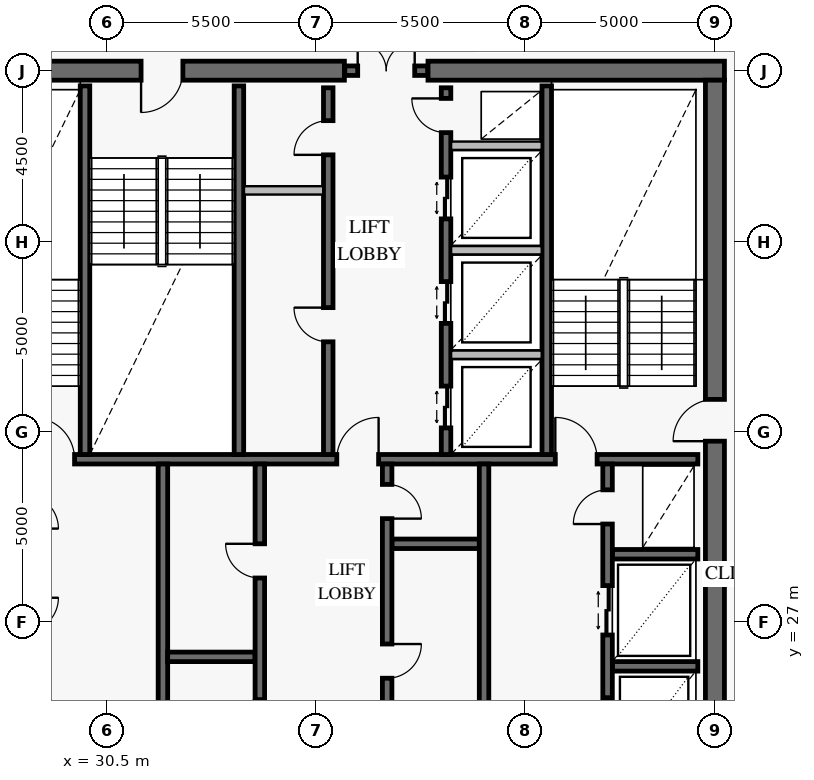
"""IFC4 building model, lengths in metres.
Left out: names, types, materials, properties, quantities, classifications, styles, units other than length and angle.
Written with IfcOpenShell. Run it as: python <this file> out.ifc"""

import sys

from ifc_helpers import new_model, si_unit, direction, frame, frame_2d, origin, place, context, subcontext, project, spatial, rectangle, extrude, element, fill, save


model = new_model("IFC4")
c1 = context("Model", 3, precision=1e-05, world=origin(), true_north=direction((0.0, 1.0)))
c2 = subcontext(c1, "Body", "Model", "MODEL_VIEW")
j1 = project(units=[si_unit("LENGTHUNIT", "METRE"), si_unit("PLANEANGLEUNIT", "RADIAN")], contexts=[c1])
p1 = place(None, origin())
s1 = spatial("IfcSite", under=j1, at=p1, CompositionType="ELEMENT")
p2 = place(p1, origin())
s2 = spatial("IfcBuilding", under=s1, at=p2, CompositionType="ELEMENT")
p3 = place(p2, frame((0.0, 0.0, 353.8)))
s3 = spatial("IfcBuildingStorey", under=s2, at=p3, CompositionType="ELEMENT", Elevation=353.8)
p4 = place(p3, frame((46.75, 41.5, 0.0), z_axis=(0.0, 0.0, 1.0), x_axis=(-1.0, 0.0, 0.0)))
e1 = element("IfcWall", 1, at=p4, inside=s3, PredefinedType="SHEAR", context=c2, shape_type="SweptSolid", body=[
    extrude(rectangle(XDim=7.8, YDim=0.5, at=frame_2d((3.9, 0.0))), origin(), (0.0, 0.0, 1.0), 3.8),
])
p5 = place(p3, frame((36.75, 41.5, 0.0), z_axis=(0.0, 0.0, 1.0), x_axis=(-1.0, 0.0, 0.0)))
e2 = element("IfcWall", 2, at=p5, inside=s3, PredefinedType="SHEAR", context=c2, shape_type="SweptSolid", body=[
    extrude(rectangle(XDim=11.5, YDim=0.5, at=frame_2d((5.75, 0.0))), origin(), (0.0, 0.0, 1.0), 3.8),
])
p6 = place(p5, frame((4.25, 0.0, 0.0)))
e3 = element("IfcOpeningElement", 3, at=p6, cuts=e2, PredefinedType="OPENING", context=c2, shape_type="SweptSolid", body=[
    extrude(rectangle(XDim=1.1, YDim=2.15, at=frame_2d((0.55, 1.075))), frame((0.0, 0.262, 0.0), z_axis=(0.0, -1.0, 0.0), x_axis=(1.0, 0.0, 0.0)), (0.0, 0.0, 1.0), 0.524),
])
p7 = place(p3, frame((46.5, 22.75, 0.0), z_axis=(0.0, 0.0, 1.0), x_axis=(0.0, 1.0, 0.0)))
e4 = element("IfcWall", 4, at=p7, inside=s3, PredefinedType="SHEAR", context=c2, shape_type="SweptSolid", body=[
    extrude(rectangle(XDim=18.5, YDim=0.5, at=frame_2d((9.25, 0.0))), origin(), (0.0, 0.0, 1.0), 3.8),
])
p8 = place(p7, frame((9.0, 0.0, 0.0)))
e5 = element("IfcOpeningElement", 5, at=p8, cuts=e4, PredefinedType="OPENING", context=c2, shape_type="SweptSolid", body=[
    extrude(rectangle(XDim=1.1, YDim=2.15, at=frame_2d((0.55, 1.075))), frame((0.0, 0.262, 0.0), z_axis=(0.0, -1.0, 0.0), x_axis=(1.0, 0.0, 0.0)), (0.0, 0.0, 1.0), 0.524),
])
p9 = place(p3, frame((36.76, 41.5, 0.0), z_axis=(0.0, 0.0, 1.0), x_axis=(1.0, 0.0, 0.0)))
e6 = element("IfcWall", 6, at=p9, inside=s3, PredefinedType="SOLIDWALL", context=c2, shape_type="SweptSolid", body=[
    extrude(rectangle(XDim=2.18, YDim=0.25, at=frame_2d((1.09, 0.0))), origin(), (0.0, 0.0, 1.0), 3.8),
])
p10 = place(p9, frame((0.34, 0.0, 0.0)))
e7 = element("IfcOpeningElement", 7, at=p10, cuts=e6, PredefinedType="OPENING", context=c2, shape_type="SweptSolid", body=[
    extrude(rectangle(XDim=1.5, YDim=2.15, at=frame_2d((0.75, 1.075))), frame((0.0, 0.137, 0.0), z_axis=(0.0, -1.0, 0.0), x_axis=(1.0, 0.0, 0.0)), (0.0, 0.0, 1.0), 0.274),
])
p11 = place(p3, frame((25.95, 31.275, 0.0), z_axis=(0.0, 0.0, 1.0), x_axis=(1.0, 0.0, 0.0)))
e8 = element("IfcWall", 8, at=p11, inside=s3, PredefinedType="SOLIDWALL", context=c2, shape_type="SweptSolid", body=[
    extrude(rectangle(XDim=20.1, YDim=0.25, at=frame_2d((10.05, 0.0))), origin(), (0.0, 0.0, 1.0), 3.8),
])
p12 = place(p11, frame((2.6, 0.0, 0.0)))
e9 = element("IfcOpeningElement", 9, at=p12, cuts=e8, PredefinedType="OPENING", context=c2, shape_type="SweptSolid", body=[
    extrude(rectangle(XDim=1.1, YDim=2.15, at=frame_2d((0.55, 1.075))), frame((0.0, 0.137, 0.0), z_axis=(0.0, -1.0, 0.0), x_axis=(1.0, 0.0, 0.0)), (0.0, 0.0, 1.0), 0.274),
])
p13 = place(p11, frame((10.6, 0.0, 0.0)))
e10 = element("IfcOpeningElement", 10, at=p13, cuts=e8, PredefinedType="OPENING", context=c2, shape_type="SweptSolid", body=[
    extrude(rectangle(XDim=1.1, YDim=2.15, at=frame_2d((0.55, 1.075))), frame((0.0, 0.137, 0.0), z_axis=(0.0, -1.0, 0.0), x_axis=(1.0, 0.0, 0.0)), (0.0, 0.0, 1.0), 0.274),
])
p14 = place(p11, frame((16.35, 0.0, 0.0)))
e11 = element("IfcOpeningElement", 11, at=p14, cuts=e8, PredefinedType="OPENING", context=c2, shape_type="SweptSolid", body=[
    extrude(rectangle(XDim=1.1, YDim=2.15, at=frame_2d((0.55, 1.075))), frame((0.0, 0.137, 0.0), z_axis=(0.0, -1.0, 0.0), x_axis=(1.0, 0.0, 0.0)), (0.0, 0.0, 1.0), 0.274),
])
for number, where, z_axis, x_axis in (
    (12, (29.925, 31.4, 0.0), (0.0, 0.0, 1.0), (0.0, 1.0, 0.0)),
    (13, (33.975, 31.4, 0.0), (0.0, 0.0, 1.0), (0.0, 1.0, 0.0)),
    (14, (42.075, 31.4, 0.0), (0.0, 0.0, 1.0), (0.0, 1.0, 0.0)),
):
    element("IfcWall", number, at=place(p3, frame(where, z_axis=z_axis, x_axis=x_axis)), inside=s3, PredefinedType="SOLIDWALL", context=c2, shape_type="SweptSolid", body=[
        extrude(rectangle(XDim=9.7, YDim=0.25, at=frame_2d((4.85, 0.0))), origin(), (0.0, 0.0, 1.0), 3.8),
    ])
p15 = place(p3, frame((36.325, 31.4, 0.0), z_axis=(0.0, 0.0, 1.0), x_axis=(0.0, 1.0, 0.0)))
e15 = element("IfcWall", 15, at=p15, inside=s3, PredefinedType="SOLIDWALL", context=c2, shape_type="SweptSolid", body=[
    extrude(rectangle(XDim=9.65, YDim=0.25, at=frame_2d((4.825, 0.0))), origin(), (0.0, 0.0, 1.0), 3.8),
])
p16 = place(p15, frame((2.965, 0.0, 0.0)))
e16 = element("IfcOpeningElement", 16, at=p16, cuts=e15, PredefinedType="OPENING", context=c2, shape_type="SweptSolid", body=[
    extrude(rectangle(XDim=0.9, YDim=2.1, at=frame_2d((0.45, 1.05))), frame((0.0, 0.137, 0.0), z_axis=(0.0, -1.0, 0.0), x_axis=(1.0, 0.0, 0.0)), (0.0, 0.0, 1.0), 0.274),
])
p17 = place(p15, frame((7.885, 0.0, 0.0)))
e17 = element("IfcOpeningElement", 17, at=p17, cuts=e15, PredefinedType="OPENING", context=c2, shape_type="SweptSolid", body=[
    extrude(rectangle(XDim=0.9, YDim=2.1, at=frame_2d((0.45, 1.05))), frame((0.0, 0.137, 0.0), z_axis=(0.0, -1.0, 0.0), x_axis=(1.0, 0.0, 0.0)), (0.0, 0.0, 1.0), 0.274),
])
p18 = place(p3, frame((39.425, 31.4, 0.0), z_axis=(0.0, 0.0, 1.0), x_axis=(0.0, 1.0, 0.0)))
e18 = element("IfcWall", 18, at=p18, inside=s3, PredefinedType="SOLIDWALL", context=c2, shape_type="SweptSolid", body=[
    extrude(rectangle(XDim=9.65, YDim=0.25, at=frame_2d((4.825, 0.0))), origin(), (0.0, 0.0, 1.0), 3.8),
])
p19 = place(p18, frame((0.7, 0.0, 0.0)))
e19 = element("IfcOpeningElement", 19, at=p19, cuts=e18, PredefinedType="OPENING", context=c2, shape_type="SweptSolid", body=[
    extrude(rectangle(XDim=1.1, YDim=2.2, at=frame_2d((0.55, 1.1))), frame((0.0, 0.137, 0.0), z_axis=(0.0, -1.0, 0.0), x_axis=(1.0, 0.0, 0.0)), (0.0, 0.0, 1.0), 0.274),
])
p20 = place(p18, frame((3.45, 0.0, 0.0)))
e20 = element("IfcOpeningElement", 20, at=p20, cuts=e18, PredefinedType="OPENING", context=c2, shape_type="SweptSolid", body=[
    extrude(rectangle(XDim=1.1, YDim=2.2, at=frame_2d((0.55, 1.1))), frame((0.0, 0.137, 0.0), z_axis=(0.0, -1.0, 0.0), x_axis=(1.0, 0.0, 0.0)), (0.0, 0.0, 1.0), 0.274),
])
p21 = place(p18, frame((6.2, 0.0, 0.0)))
e21 = element("IfcOpeningElement", 21, at=p21, cuts=e18, PredefinedType="OPENING", context=c2, shape_type="SweptSolid", body=[
    extrude(rectangle(XDim=1.1, YDim=2.2, at=frame_2d((0.55, 1.1))), frame((0.0, 0.137, 0.0), z_axis=(0.0, -1.0, 0.0), x_axis=(1.0, 0.0, 0.0)), (0.0, 0.0, 1.0), 0.274),
])
p22 = place(p18, frame((8.47, 0.0, 0.0)))
e22 = element("IfcOpeningElement", 22, at=p22, cuts=e18, PredefinedType="OPENING", context=c2, shape_type="SweptSolid", body=[
    extrude(rectangle(XDim=0.9, YDim=2.1, at=frame_2d((0.45, 1.05))), frame((0.0, 0.137, 0.0), z_axis=(0.0, -1.0, 0.0), x_axis=(1.0, 0.0, 0.0)), (0.0, 0.0, 1.0), 0.274),
])
p23 = place(p3, frame((31.975, 22.95, 0.0), z_axis=(0.0, 0.0, 1.0), x_axis=(0.0, 1.0, 0.0)))
e23 = element("IfcWall", 23, at=p23, inside=s3, PredefinedType="SOLIDWALL", context=c2, shape_type="SweptSolid", body=[
    extrude(rectangle(XDim=8.2, YDim=0.25, at=frame_2d((4.1, 0.0))), origin(), (0.0, 0.0, 1.0), 3.8),
])
p24 = place(p3, frame((32.1, 26.075, 0.0), z_axis=(0.0, 0.0, 1.0), x_axis=(1.0, 0.0, 0.0)))
e24 = element("IfcWall", 24, at=p24, inside=s3, PredefinedType="SOLIDWALL", context=c2, shape_type="SweptSolid", body=[
    extrude(rectangle(XDim=2.3, YDim=0.25, at=frame_2d((1.15, 0.0))), origin(), (0.0, 0.0, 1.0), 3.8),
])
p25 = place(p3, frame((34.525, 22.95, 0.0), z_axis=(0.0, 0.0, 1.0), x_axis=(0.0, 1.0, 0.0)))
e25 = element("IfcWall", 25, at=p25, inside=s3, PredefinedType="SOLIDWALL", context=c2, shape_type="SweptSolid", body=[
    extrude(rectangle(XDim=8.2, YDim=0.25, at=frame_2d((4.1, 0.0))), origin(), (0.0, 0.0, 1.0), 3.8),
])
p26 = place(p25, frame((1.1, 0.0, 0.0)))
e26 = element("IfcOpeningElement", 26, at=p26, cuts=e25, PredefinedType="OPENING", context=c2, shape_type="SweptSolid", body=[
    extrude(rectangle(XDim=0.9, YDim=2.1, at=frame_2d((0.45, 1.05))), frame((0.0, 0.137, 0.0), z_axis=(0.0, -1.0, 0.0), x_axis=(1.0, 0.0, 0.0)), (0.0, 0.0, 1.0), 0.274),
])
p27 = place(p25, frame((5.2, 0.0, 0.0)))
e27 = element("IfcOpeningElement", 27, at=p27, cuts=e25, PredefinedType="OPENING", context=c2, shape_type="SweptSolid", body=[
    extrude(rectangle(XDim=0.9, YDim=2.1, at=frame_2d((0.45, 1.05))), frame((0.0, 0.137, 0.0), z_axis=(0.0, -1.0, 0.0), x_axis=(1.0, 0.0, 0.0)), (0.0, 0.0, 1.0), 0.274),
])
p28 = place(p3, frame((38.0, 29.05, 0.0), z_axis=(0.0, 0.0, 1.0), x_axis=(1.0, 0.0, 0.0)))
e28 = element("IfcWall", 28, at=p28, inside=s3, PredefinedType="SOLIDWALL", context=c2, shape_type="SweptSolid", body=[
    extrude(rectangle(XDim=2.3, YDim=0.25, at=frame_2d((1.15, 0.0))), origin(), (0.0, 0.0, 1.0), 3.8),
])
p29 = place(p3, frame((37.875, 22.95, 0.0), z_axis=(0.0, 0.0, 1.0), x_axis=(0.0, 1.0, 0.0)))
e29 = element("IfcWall", 29, at=p29, inside=s3, PredefinedType="SOLIDWALL", context=c2, shape_type="SweptSolid", body=[
    extrude(rectangle(XDim=8.2, YDim=0.25, at=frame_2d((4.1, 0.0))), origin(), (0.0, 0.0, 1.0), 3.8),
])
p30 = place(p29, frame((2.562, 0.0, 0.0)))
e30 = element("IfcOpeningElement", 30, at=p30, cuts=e29, PredefinedType="OPENING", context=c2, shape_type="SweptSolid", body=[
    extrude(rectangle(XDim=0.9, YDim=2.1, at=frame_2d((0.45, 1.05))), frame((0.0, 0.137, 0.0), z_axis=(0.0, -1.0, 0.0), x_axis=(1.0, 0.0, 0.0)), (0.0, 0.0, 1.0), 0.274),
])
p31 = place(p29, frame((6.762, 0.0, 0.0)))
e31 = element("IfcOpeningElement", 31, at=p31, cuts=e29, PredefinedType="OPENING", context=c2, shape_type="SweptSolid", body=[
    extrude(rectangle(XDim=0.9, YDim=2.1, at=frame_2d((0.45, 1.05))), frame((0.0, 0.137, 0.0), z_axis=(0.0, -1.0, 0.0), x_axis=(1.0, 0.0, 0.0)), (0.0, 0.0, 1.0), 0.274),
])
p32 = place(p3, frame((40.425, 22.95, 0.0), z_axis=(0.0, 0.0, 1.0), x_axis=(0.0, 1.0, 0.0)))
e32 = element("IfcWall", 32, at=p32, inside=s3, PredefinedType="SOLIDWALL", context=c2, shape_type="SweptSolid", body=[
    extrude(rectangle(XDim=8.2, YDim=0.25, at=frame_2d((4.1, 0.0))), origin(), (0.0, 0.0, 1.0), 3.8),
])
for number, where, z_axis, x_axis in (
    (33, (43.8, 25.825, 0.0), (0.0, 0.0, 1.0), (1.0, 0.0, 0.0)),
    (34, (43.8, 28.775, 0.0), (0.0, 0.0, 1.0), (1.0, 0.0, 0.0)),
):
    element("IfcWall", number, at=place(p3, frame(where, z_axis=z_axis, x_axis=x_axis)), inside=s3, PredefinedType="SOLIDWALL", context=c2, shape_type="SweptSolid", body=[
        extrude(rectangle(XDim=2.25, YDim=0.25, at=frame_2d((1.125, 0.0))), origin(), (0.0, 0.0, 1.0), 3.8),
    ])
p33 = place(p3, frame((43.675, 22.95, 0.0), z_axis=(0.0, 0.0, 1.0), x_axis=(0.0, 1.0, 0.0)))
e35 = element("IfcWall", 35, at=p33, inside=s3, PredefinedType="SOLIDWALL", context=c2, shape_type="SweptSolid", body=[
    extrude(rectangle(XDim=8.2, YDim=0.25, at=frame_2d((4.1, 0.0))), origin(), (0.0, 0.0, 1.0), 3.8),
])
p34 = place(p33, frame((0.75, 0.0, 0.0)))
e36 = element("IfcOpeningElement", 36, at=p34, cuts=e35, PredefinedType="OPENING", context=c2, shape_type="SweptSolid", body=[
    extrude(rectangle(XDim=1.3, YDim=2.3, at=frame_2d((0.65, 1.15))), frame((0.0, 0.137, 0.0), z_axis=(0.0, -1.0, 0.0), x_axis=(1.0, 0.0, 0.0)), (0.0, 0.0, 1.0), 0.274),
])
p35 = place(p33, frame((3.7, 0.0, 0.0)))
e37 = element("IfcOpeningElement", 37, at=p35, cuts=e35, PredefinedType="OPENING", context=c2, shape_type="SweptSolid", body=[
    extrude(rectangle(XDim=1.3, YDim=2.3, at=frame_2d((0.65, 1.15))), frame((0.0, 0.137, 0.0), z_axis=(0.0, -1.0, 0.0), x_axis=(1.0, 0.0, 0.0)), (0.0, 0.0, 1.0), 0.274),
])
p36 = place(p33, frame((6.62, 0.0, 0.0)))
e38 = element("IfcOpeningElement", 38, at=p36, cuts=e35, PredefinedType="OPENING", context=c2, shape_type="SweptSolid", body=[
    extrude(rectangle(XDim=0.9, YDim=2.1, at=frame_2d((0.45, 1.05))), frame((0.0, 0.137, 0.0), z_axis=(0.0, -1.0, 0.0), x_axis=(1.0, 0.0, 0.0)), (0.0, 0.0, 1.0), 0.274),
])
p37 = place(p3, frame((34.108, 38.35, 0.0), z_axis=(0.0, 0.0, 1.0), x_axis=(1.0, 0.0, 0.0)))
e39 = element("IfcWall", 39, at=p37, inside=s3, PredefinedType="PARTITIONING", context=c2, shape_type="SweptSolid", body=[
    extrude(rectangle(XDim=2.084, YDim=0.22, at=frame_2d((1.042, 0.0))), origin(), (0.0, 0.0, 1.0), 3.35),
])
for number, where, z_axis, x_axis in (
    (40, (39.558, 34.025, 0.0), (0.0, 0.0, 1.0), (1.0, 0.0, 0.0)),
    (41, (39.558, 36.775, 0.0), (0.0, 0.0, 1.0), (1.0, 0.0, 0.0)),
    (42, (39.558, 39.525, 0.0), (0.0, 0.0, 1.0), (1.0, 0.0, 0.0)),
):
    element("IfcWall", number, at=place(p3, frame(where, z_axis=z_axis, x_axis=x_axis)), inside=s3, PredefinedType="PARTITIONING", context=c2, shape_type="SweptSolid", body=[
        extrude(rectangle(XDim=2.384, YDim=0.22, at=frame_2d((1.192, 0.0))), origin(), (0.0, 0.0, 1.0), 3.35),
    ])
p38 = place(p8, origin())
e43 = element("IfcDoor", 43, at=p38, inside=s3, OperationType="SINGLE_SWING_LEFT", PredefinedType="USERDEFINED", context=c2, shape_type="SweptSolid", body=[
    extrude(rectangle(XDim=1.1, YDim=2.15, at=frame_2d((0.55, 1.075))), frame((0.0, 0.025, 0.0), z_axis=(0.0, -1.0, 0.0), x_axis=(1.0, 0.0, 0.0)), (0.0, 0.0, 1.0), 0.05),
])
fill(e5, e43)
p39 = place(p6, origin())
e44 = element("IfcDoor", 44, at=p39, inside=s3, OperationType="SINGLE_SWING_RIGHT", PredefinedType="USERDEFINED", context=c2, shape_type="SweptSolid", body=[
    extrude(rectangle(XDim=1.1, YDim=2.15, at=frame_2d((0.55, 1.075))), frame((0.0, 0.025, 0.0), z_axis=(0.0, -1.0, 0.0), x_axis=(1.0, 0.0, 0.0)), (0.0, 0.0, 1.0), 0.05),
])
fill(e3, e44)
p40 = place(p10, origin())
e45 = element("IfcDoor", 45, at=p40, inside=s3, OperationType="DOUBLE_DOOR_SINGLE_SWING", PredefinedType="DOOR", context=c2, shape_type="SweptSolid", body=[
    extrude(rectangle(XDim=1.5, YDim=2.15, at=frame_2d((0.75, 1.075))), frame((0.0, 0.025, 0.0), z_axis=(0.0, -1.0, 0.0), x_axis=(1.0, 0.0, 0.0)), (0.0, 0.0, 1.0), 0.05),
])
fill(e7, e45)
p41 = place(p12, origin())
e46 = element("IfcDoor", 46, at=p41, inside=s3, OperationType="SINGLE_SWING_LEFT", PredefinedType="USERDEFINED", context=c2, shape_type="SweptSolid", body=[
    extrude(rectangle(XDim=1.1, YDim=2.15, at=frame_2d((0.55, 1.075))), frame((0.0, 0.025, 0.0), z_axis=(0.0, -1.0, 0.0), x_axis=(1.0, 0.0, 0.0)), (0.0, 0.0, 1.0), 0.05),
])
fill(e9, e46)
p42 = place(p13, origin())
e47 = element("IfcDoor", 47, at=p42, inside=s3, OperationType="SINGLE_SWING_RIGHT", PredefinedType="USERDEFINED", context=c2, shape_type="SweptSolid", body=[
    extrude(rectangle(XDim=1.1, YDim=2.15, at=frame_2d((0.55, 1.075))), frame((0.0, 0.025, 0.0), z_axis=(0.0, -1.0, 0.0), x_axis=(1.0, 0.0, 0.0)), (0.0, 0.0, 1.0), 0.05),
])
fill(e10, e47)
p43 = place(p14, origin())
e48 = element("IfcDoor", 48, at=p43, inside=s3, OperationType="SINGLE_SWING_LEFT", PredefinedType="USERDEFINED", context=c2, shape_type="SweptSolid", body=[
    extrude(rectangle(XDim=1.1, YDim=2.15, at=frame_2d((0.55, 1.075))), frame((0.0, 0.025, 0.0), z_axis=(0.0, -1.0, 0.0), x_axis=(1.0, 0.0, 0.0)), (0.0, 0.0, 1.0), 0.05),
])
fill(e11, e48)
p44 = place(p16, origin())
e49 = element("IfcDoor", 49, at=p44, inside=s3, OperationType="SINGLE_SWING_RIGHT", PredefinedType="DOOR", context=c2, shape_type="SweptSolid", body=[
    extrude(rectangle(XDim=0.9, YDim=2.1, at=frame_2d((0.45, 1.05))), frame((0.0, 0.025, 0.0), z_axis=(0.0, -1.0, 0.0), x_axis=(1.0, 0.0, 0.0)), (0.0, 0.0, 1.0), 0.05),
])
fill(e16, e49)
p45 = place(p17, origin())
e50 = element("IfcDoor", 50, at=p45, inside=s3, OperationType="SINGLE_SWING_LEFT", PredefinedType="DOOR", context=c2, shape_type="SweptSolid", body=[
    extrude(rectangle(XDim=0.9, YDim=2.1, at=frame_2d((0.45, 1.05))), frame((0.0, 0.025, 0.0), z_axis=(0.0, -1.0, 0.0), x_axis=(1.0, 0.0, 0.0)), (0.0, 0.0, 1.0), 0.05),
])
fill(e17, e50)
p46 = place(p19, origin())
e51 = element("IfcDoor", 51, at=p46, inside=s3, OperationType="DOUBLE_DOOR_SLIDING", PredefinedType="DOOR", context=c2, shape_type="SweptSolid", body=[
    extrude(rectangle(XDim=1.1, YDim=2.2, at=frame_2d((0.55, 1.1))), frame((0.0, 0.025, 0.0), z_axis=(0.0, -1.0, 0.0), x_axis=(1.0, 0.0, 0.0)), (0.0, 0.0, 1.0), 0.05),
])
fill(e19, e51)
p47 = place(p20, origin())
e52 = element("IfcDoor", 52, at=p47, inside=s3, OperationType="DOUBLE_DOOR_SLIDING", PredefinedType="DOOR", context=c2, shape_type="SweptSolid", body=[
    extrude(rectangle(XDim=1.1, YDim=2.2, at=frame_2d((0.55, 1.1))), frame((0.0, 0.025, 0.0), z_axis=(0.0, -1.0, 0.0), x_axis=(1.0, 0.0, 0.0)), (0.0, 0.0, 1.0), 0.05),
])
fill(e20, e52)
p48 = place(p21, origin())
e53 = element("IfcDoor", 53, at=p48, inside=s3, OperationType="DOUBLE_DOOR_SLIDING", PredefinedType="DOOR", context=c2, shape_type="SweptSolid", body=[
    extrude(rectangle(XDim=1.1, YDim=2.2, at=frame_2d((0.55, 1.1))), frame((0.0, 0.025, 0.0), z_axis=(0.0, -1.0, 0.0), x_axis=(1.0, 0.0, 0.0)), (0.0, 0.0, 1.0), 0.05),
])
fill(e21, e53)
p49 = place(p22, origin())
e54 = element("IfcDoor", 54, at=p49, inside=s3, OperationType="SINGLE_SWING_RIGHT", PredefinedType="DOOR", context=c2, shape_type="SweptSolid", body=[
    extrude(rectangle(XDim=0.9, YDim=2.1, at=frame_2d((0.45, 1.05))), frame((0.0, 0.025, 0.0), z_axis=(0.0, -1.0, 0.0), x_axis=(1.0, 0.0, 0.0)), (0.0, 0.0, 1.0), 0.05),
])
fill(e22, e54)
p50 = place(p27, origin())
e55 = element("IfcDoor", 55, at=p50, inside=s3, OperationType="SINGLE_SWING_RIGHT", PredefinedType="DOOR", context=c2, shape_type="SweptSolid", body=[
    extrude(rectangle(XDim=0.9, YDim=2.1, at=frame_2d((0.45, 1.05))), frame((0.0, 0.025, 0.0), z_axis=(0.0, -1.0, 0.0), x_axis=(1.0, 0.0, 0.0)), (0.0, 0.0, 1.0), 0.05),
])
fill(e27, e55)
p51 = place(p30, frame((0.9, 0.0, 0.0), z_axis=(0.0, 0.0, 1.0), x_axis=(-1.0, 0.0, 0.0)))
e56 = element("IfcDoor", 56, at=p51, inside=s3, OperationType="SINGLE_SWING_LEFT", PredefinedType="DOOR", context=c2, shape_type="SweptSolid", body=[
    extrude(rectangle(XDim=0.9, YDim=2.1, at=frame_2d((0.45, 1.05))), frame((0.0, 0.025, 0.0), z_axis=(0.0, -1.0, 0.0), x_axis=(1.0, 0.0, 0.0)), (0.0, 0.0, 1.0), 0.05),
])
fill(e30, e56)
p52 = place(p31, frame((0.9, 0.0, 0.0), z_axis=(0.0, 0.0, 1.0), x_axis=(-1.0, 0.0, 0.0)))
e57 = element("IfcDoor", 57, at=p52, inside=s3, OperationType="SINGLE_SWING_RIGHT", PredefinedType="DOOR", context=c2, shape_type="SweptSolid", body=[
    extrude(rectangle(XDim=0.9, YDim=2.1, at=frame_2d((0.45, 1.05))), frame((0.0, 0.025, 0.0), z_axis=(0.0, -1.0, 0.0), x_axis=(1.0, 0.0, 0.0)), (0.0, 0.0, 1.0), 0.05),
])
fill(e31, e57)
p53 = place(p34, origin())
e58 = element("IfcDoor", 58, at=p53, inside=s3, OperationType="DOUBLE_DOOR_SLIDING", PredefinedType="DOOR", context=c2, shape_type="SweptSolid", body=[
    extrude(rectangle(XDim=1.3, YDim=2.3, at=frame_2d((0.65, 1.15))), frame((0.0, 0.025, 0.0), z_axis=(0.0, -1.0, 0.0), x_axis=(1.0, 0.0, 0.0)), (0.0, 0.0, 1.0), 0.05),
])
fill(e36, e58)
p54 = place(p35, origin())
e59 = element("IfcDoor", 59, at=p54, inside=s3, OperationType="DOUBLE_DOOR_SLIDING", PredefinedType="DOOR", context=c2, shape_type="SweptSolid", body=[
    extrude(rectangle(XDim=1.3, YDim=2.3, at=frame_2d((0.65, 1.15))), frame((0.0, 0.025, 0.0), z_axis=(0.0, -1.0, 0.0), x_axis=(1.0, 0.0, 0.0)), (0.0, 0.0, 1.0), 0.05),
])
fill(e37, e59)
p55 = place(p36, origin())
e60 = element("IfcDoor", 60, at=p55, inside=s3, OperationType="SINGLE_SWING_LEFT", PredefinedType="DOOR", context=c2, shape_type="SweptSolid", body=[
    extrude(rectangle(XDim=0.9, YDim=2.1, at=frame_2d((0.45, 1.05))), frame((0.0, 0.025, 0.0), z_axis=(0.0, -1.0, 0.0), x_axis=(1.0, 0.0, 0.0)), (0.0, 0.0, 1.0), 0.05),
])
fill(e38, e60)
save(model, sys.argv[1])
